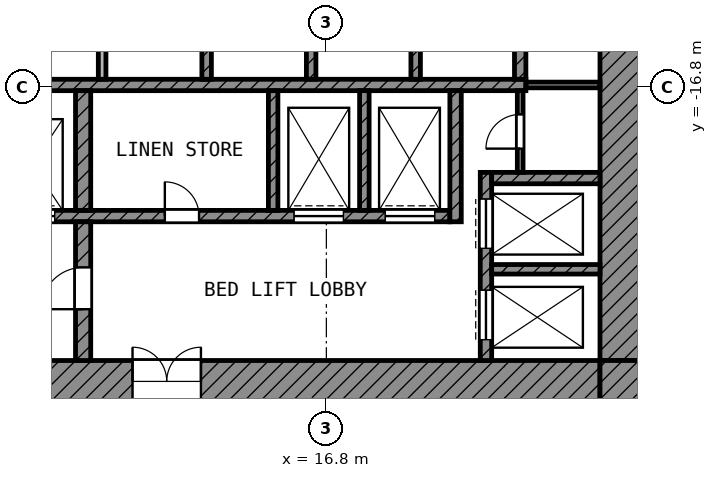
"""IFC4 building model, lengths in metres.
Left out: names, types, materials, properties, quantities, classifications, styles, units other than length and angle.
Written with IfcOpenShell. Run it as: python <this file> out.ifc"""

import sys

from ifc_helpers import new_model, si_unit, direction, frame, frame_2d, origin, place, context, subcontext, project, spatial, rectangle, extrude, element, fill, save


model = new_model("IFC4")
c1 = context("Model", 3, precision=1e-05, world=origin(), true_north=direction((0.0, 1.0)))
c2 = subcontext(c1, "Body", "Model", "MODEL_VIEW")
j1 = project(units=[si_unit("LENGTHUNIT", "METRE"), si_unit("PLANEANGLEUNIT", "RADIAN")], contexts=[c1])
p1 = place(None, origin())
s1 = spatial("IfcSite", under=j1, at=p1, CompositionType="ELEMENT")
p2 = place(p1, origin())
s2 = spatial("IfcBuilding", under=s1, at=p2, CompositionType="ELEMENT")
p3 = place(p2, frame((0.0, 0.0, 77.0)))
s3 = spatial("IfcBuildingStorey", under=s2, at=p3, CompositionType="ELEMENT", Elevation=77.0)
p4 = place(p3, frame((24.55, -24.0, 0.0), z_axis=(0.0, 0.0, 1.0), x_axis=(0.0, 1.0, 0.0)))
e1 = element("IfcWall", 1, at=p4, inside=s3, PredefinedType="SHEAR", context=c2, shape_type="SweptSolid", body=[
    extrude(rectangle(XDim=18.6, YDim=1.1, at=frame_2d((9.3, 0.0))), origin(), (0.0, 0.0, 1.0), 3.9),
])
p5 = place(p4, frame((10.5, 0.0, 0.0)))
e2 = element("IfcOpeningElement", 2, at=p5, cuts=e1, PredefinedType="OPENING", context=c2, shape_type="SweptSolid", body=[
    extrude(rectangle(XDim=1.8, YDim=2.1, at=frame_2d((0.9, 1.05))), frame((0.0, 0.56, 0.0), z_axis=(0.0, -1.0, 0.0), x_axis=(1.0, 0.0, 0.0)), (0.0, 0.0, 1.0), 1.12),
])
p6 = place(p3, frame((5.4, -24.55, 0.0), z_axis=(0.0, 0.0, 1.0), x_axis=(1.0, 0.0, 0.0)))
e3 = element("IfcWall", 3, at=p6, inside=s3, PredefinedType="SHEAR", context=c2, shape_type="SweptSolid", body=[
    extrude(rectangle(XDim=18.6, YDim=1.1, at=frame_2d((9.3, 0.0))), origin(), (0.0, 0.0, 1.0), 3.9),
])
p7 = place(p6, frame((6.3, 0.0, 0.0)))
e4 = element("IfcOpeningElement", 4, at=p7, cuts=e3, PredefinedType="OPENING", context=c2, shape_type="SweptSolid", body=[
    extrude(rectangle(XDim=1.8, YDim=2.1, at=frame_2d((0.9, 1.05))), frame((0.0, 0.56, 0.0), z_axis=(0.0, -1.0, 0.0), x_axis=(1.0, 0.0, 0.0)), (0.0, 0.0, 1.0), 1.12),
])
p8 = place(p3, frame((24.55, -25.1, 0.0), z_axis=(0.0, 0.0, 1.0), x_axis=(0.0, 1.0, 0.0)))
e5 = element("IfcWall", 5, at=p8, inside=s3, PredefinedType="SHEAR", context=c2, shape_type="SweptSolid", body=[
    extrude(rectangle(XDim=1.1, YDim=1.1, at=frame_2d((0.55, 0.0))), origin(), (0.0, 0.0, 1.0), 3.9),
])
p9 = place(p3, frame((5.4, -16.75, 0.0), z_axis=(0.0, 0.0, 1.0), x_axis=(1.0, 0.0, 0.0)))
e6 = element("IfcWall", 6, at=p9, inside=s3, PredefinedType="SHEAR", context=c2, shape_type="SweptSolid", body=[
    extrude(rectangle(XDim=16.65, YDim=0.3, at=frame_2d((8.325, 0.0))), origin(), (0.0, 0.0, 1.0), 3.9),
])
p10 = place(p3, frame((5.4, -20.2, 0.0), z_axis=(0.0, 0.0, 1.0), x_axis=(1.0, 0.0, 0.0)))
e7 = element("IfcWall", 7, at=p10, inside=s3, PredefinedType="SHEAR", context=c2, shape_type="SweptSolid", body=[
    extrude(rectangle(XDim=14.65, YDim=0.3, at=frame_2d((7.325, 0.0))), origin(), (0.0, 0.0, 1.0), 3.9),
])
p11 = place(p10, frame((10.55, 0.0, 0.0)))
e8 = element("IfcOpeningElement", 8, at=p11, cuts=e7, PredefinedType="OPENING", context=c2, shape_type="SweptSolid", body=[
    extrude(rectangle(XDim=1.3, YDim=2.1, at=frame_2d((0.65, 1.05))), frame((0.0, 0.16, 0.0), z_axis=(0.0, -1.0, 0.0), x_axis=(1.0, 0.0, 0.0)), (0.0, 0.0, 1.0), 0.32),
])
p12 = place(p10, frame((12.95, 0.0, 0.0)))
e9 = element("IfcOpeningElement", 9, at=p12, cuts=e7, PredefinedType="OPENING", context=c2, shape_type="SweptSolid", body=[
    extrude(rectangle(XDim=1.3, YDim=2.1, at=frame_2d((0.65, 1.05))), frame((0.0, 0.16, 0.0), z_axis=(0.0, -1.0, 0.0), x_axis=(1.0, 0.0, 0.0)), (0.0, 0.0, 1.0), 0.32),
])
p13 = place(p10, frame((0.55, 0.0, 0.0)))
e10 = element("IfcOpeningElement", 10, at=p13, cuts=e7, PredefinedType="OPENING", context=c2, shape_type="SweptSolid", body=[
    extrude(rectangle(XDim=1.3, YDim=2.1, at=frame_2d((0.65, 1.05))), frame((0.0, 0.16, 0.0), z_axis=(0.0, -1.0, 0.0), x_axis=(1.0, 0.0, 0.0)), (0.0, 0.0, 1.0), 0.32),
])
p14 = place(p10, frame((2.95, 0.0, 0.0)))
e11 = element("IfcOpeningElement", 11, at=p14, cuts=e7, PredefinedType="OPENING", context=c2, shape_type="SweptSolid", body=[
    extrude(rectangle(XDim=1.3, YDim=2.1, at=frame_2d((0.65, 1.05))), frame((0.0, 0.16, 0.0), z_axis=(0.0, -1.0, 0.0), x_axis=(1.0, 0.0, 0.0)), (0.0, 0.0, 1.0), 0.32),
])
p15 = place(p10, frame((7.15, 0.0, 0.0)))
e12 = element("IfcOpeningElement", 12, at=p15, cuts=e7, PredefinedType="OPENING", context=c2, shape_type="SweptSolid", body=[
    extrude(rectangle(XDim=0.9, YDim=2.1, at=frame_2d((0.45, 1.05))), frame((0.0, 0.16, 0.0), z_axis=(0.0, -1.0, 0.0), x_axis=(1.0, 0.0, 0.0)), (0.0, 0.0, 1.0), 0.32),
])
p16 = place(p3, frame((10.4, -24.0, 0.0), z_axis=(0.0, 0.0, 1.0), x_axis=(0.0, 1.0, 0.0)))
e13 = element("IfcWall", 13, at=p16, inside=s3, PredefinedType="SHEAR", context=c2, shape_type="SweptSolid", body=[
    extrude(rectangle(XDim=3.65, YDim=0.4, at=frame_2d((1.825, 0.0))), origin(), (0.0, 0.0, 1.0), 3.9),
])
p17 = place(p16, frame((1.35, 0.0, 0.0)))
e14 = element("IfcOpeningElement", 14, at=p17, cuts=e13, PredefinedType="OPENING", context=c2, shape_type="SweptSolid", body=[
    extrude(rectangle(XDim=1.1, YDim=2.1, at=frame_2d((0.55, 1.05))), frame((0.0, 0.21, 0.0), z_axis=(0.0, -1.0, 0.0), x_axis=(1.0, 0.0, 0.0)), (0.0, 0.0, 1.0), 0.42),
])
p18 = place(p3, frame((10.4, -20.05, 0.0), z_axis=(0.0, 0.0, 1.0), x_axis=(0.0, 1.0, 0.0)))
e15 = element("IfcWall", 15, at=p18, inside=s3, PredefinedType="SHEAR", context=c2, shape_type="SweptSolid", body=[
    extrude(rectangle(XDim=3.15, YDim=0.4, at=frame_2d((1.575, 0.0))), origin(), (0.0, 0.0, 1.0), 3.9),
])
p19 = place(p3, frame((20.2, -20.35, 0.0), z_axis=(0.0, 0.0, 1.0), x_axis=(0.0, 1.0, 0.0)))
e16 = element("IfcWall", 16, at=p19, inside=s3, PredefinedType="SHEAR", context=c2, shape_type="SweptSolid", body=[
    extrude(rectangle(XDim=3.45, YDim=0.3, at=frame_2d((1.725, 0.0))), origin(), (0.0, 0.0, 1.0), 3.9),
])
p20 = place(p3, frame((21.9, -16.6, 0.0), z_axis=(0.0, 0.0, 1.0), x_axis=(0.0, 1.0, 0.0)))
e17 = element("IfcWall", 17, at=p20, inside=s3, PredefinedType="SHEAR", context=c2, shape_type="SweptSolid", body=[
    extrude(rectangle(XDim=2.35, YDim=0.3, at=frame_2d((1.175, 0.0))), origin(), (0.0, 0.0, 1.0), 3.9),
])
p21 = place(p3, frame((21.15, -19.2, 0.0), z_axis=(0.0, 0.0, 1.0), x_axis=(1.0, 0.0, 0.0)))
e18 = element("IfcWall", 18, at=p21, inside=s3, PredefinedType="SHEAR", context=c2, shape_type="SweptSolid", body=[
    extrude(rectangle(XDim=2.85, YDim=0.3, at=frame_2d((1.425, 0.0))), origin(), (0.0, 0.0, 1.0), 3.9),
])
p22 = place(p3, frame((21.0, -24.0, 0.0), z_axis=(0.0, 0.0, 1.0), x_axis=(0.0, 1.0, 0.0)))
e19 = element("IfcWall", 19, at=p22, inside=s3, PredefinedType="SHEAR", context=c2, shape_type="SweptSolid", body=[
    extrude(rectangle(XDim=4.95, YDim=0.3, at=frame_2d((2.475, 0.0))), origin(), (0.0, 0.0, 1.0), 3.9),
])
p23 = place(p22, frame((2.95, 0.0, 0.0)))
e20 = element("IfcOpeningElement", 20, at=p23, cuts=e19, PredefinedType="OPENING", context=c2, shape_type="SweptSolid", body=[
    extrude(rectangle(XDim=1.3, YDim=2.1, at=frame_2d((0.65, 1.05))), frame((0.0, 0.16, 0.0), z_axis=(0.0, -1.0, 0.0), x_axis=(1.0, 0.0, 0.0)), (0.0, 0.0, 1.0), 0.32),
])
p24 = place(p22, frame((0.55, 0.0, 0.0)))
e21 = element("IfcOpeningElement", 21, at=p24, cuts=e19, PredefinedType="OPENING", context=c2, shape_type="SweptSolid", body=[
    extrude(rectangle(XDim=1.3, YDim=2.1, at=frame_2d((0.65, 1.05))), frame((0.0, 0.16, 0.0), z_axis=(0.0, -1.0, 0.0), x_axis=(1.0, 0.0, 0.0)), (0.0, 0.0, 1.0), 0.32),
])
p25 = place(p3, frame((21.15, -21.6, 0.0), z_axis=(0.0, 0.0, 1.0), x_axis=(1.0, 0.0, 0.0)))
e22 = element("IfcWall", 22, at=p25, inside=s3, PredefinedType="SHEAR", context=c2, shape_type="SweptSolid", body=[
    extrude(rectangle(XDim=2.85, YDim=0.25, at=frame_2d((1.425, 0.0))), origin(), (0.0, 0.0, 1.0), 3.9),
])
for number, where, z_axis, x_axis in (
    (23, (15.4, -20.05, 0.0), (0.0, 0.0, 1.0), (0.0, 1.0, 0.0)),
    (24, (17.8, -20.05, 0.0), (0.0, 0.0, 1.0), (0.0, 1.0, 0.0)),
):
    element("IfcWall", number, at=place(p3, frame(where, z_axis=z_axis, x_axis=x_axis)), inside=s3, PredefinedType="SHEAR", context=c2, shape_type="SweptSolid", body=[
        extrude(rectangle(XDim=3.15, YDim=0.25, at=frame_2d((1.575, 0.0))), origin(), (0.0, 0.0, 1.0), 3.9),
    ])
p26 = place(p3, frame((10.9, -16.6, 0.0), z_axis=(0.0, 0.0, 1.0), x_axis=(0.0, 1.0, 0.0)))
e25 = element("IfcWall", 25, at=p26, inside=s3, PredefinedType="PARTITIONING", context=c2, shape_type="SweptSolid", body=[
    extrude(rectangle(XDim=2.35, YDim=0.2, at=frame_2d((1.175, 0.0))), origin(), (0.0, 0.0, 1.0), 3.9),
])
for number, where, z_axis, x_axis in (
    (26, (13.65, -16.6, 0.0), (0.0, 0.0, 1.0), (0.0, 1.0, 0.0)),
    (27, (16.4, -16.6, 0.0), (0.0, 0.0, 1.0), (0.0, 1.0, 0.0)),
    (28, (19.15, -16.6, 0.0), (0.0, 0.0, 1.0), (0.0, 1.0, 0.0)),
):
    element("IfcWall", number, at=place(p3, frame(where, z_axis=z_axis, x_axis=x_axis)), inside=s3, PredefinedType="SHEAR", context=c2, shape_type="SweptSolid", body=[
        extrude(rectangle(XDim=2.35, YDim=0.25, at=frame_2d((1.175, 0.0))), origin(), (0.0, 0.0, 1.0), 3.9),
    ])
p27 = place(p3, frame((21.9, -19.05, 0.0), z_axis=(0.0, 0.0, 1.0), x_axis=(0.0, 1.0, 0.0)))
e29 = element("IfcWall", 29, at=p27, inside=s3, PredefinedType="PARTITIONING", context=c2, shape_type="SweptSolid", body=[
    extrude(rectangle(XDim=2.15, YDim=0.15, at=frame_2d((1.075, 0.0))), origin(), (0.0, 0.0, 1.0), 3.9),
])
p28 = place(p27, frame((0.625, 0.0, 0.0)))
e30 = element("IfcOpeningElement", 30, at=p28, cuts=e29, PredefinedType="OPENING", context=c2, shape_type="SweptSolid", body=[
    extrude(rectangle(XDim=0.9, YDim=2.1, at=frame_2d((0.45, 1.05))), frame((0.0, 0.085, 0.0), z_axis=(0.0, -1.0, 0.0), x_axis=(1.0, 0.0, 0.0)), (0.0, 0.0, 1.0), 0.17),
])
p29 = place(p3, frame((22.05, -16.75, 0.0), z_axis=(0.0, 0.0, 1.0), x_axis=(1.0, 0.0, 0.0)))
e31 = element("IfcWall", 31, at=p29, inside=s3, PredefinedType="PARTITIONING", context=c2, shape_type="SweptSolid", body=[
    extrude(rectangle(XDim=1.95, YDim=0.15, at=frame_2d((0.975, 0.0))), origin(), (0.0, 0.0, 1.0), 3.9),
])
p30 = place(p23, origin())
e32 = element("IfcDoor", 32, at=p30, inside=s3, OperationType="DOUBLE_DOOR_SLIDING", PredefinedType="DOOR", context=c2, shape_type="SweptSolid", body=[
    extrude(rectangle(XDim=1.3, YDim=2.1, at=frame_2d((0.65, 1.05))), frame((0.0, 0.025, 0.0), z_axis=(0.0, -1.0, 0.0), x_axis=(1.0, 0.0, 0.0)), (0.0, 0.0, 1.0), 0.05),
])
fill(e20, e32)
p31 = place(p24, origin())
e33 = element("IfcDoor", 33, at=p31, inside=s3, OperationType="DOUBLE_DOOR_SLIDING", PredefinedType="DOOR", context=c2, shape_type="SweptSolid", body=[
    extrude(rectangle(XDim=1.3, YDim=2.1, at=frame_2d((0.65, 1.05))), frame((0.0, 0.025, 0.0), z_axis=(0.0, -1.0, 0.0), x_axis=(1.0, 0.0, 0.0)), (0.0, 0.0, 1.0), 0.05),
])
fill(e21, e33)
p32 = place(p11, origin())
e34 = element("IfcDoor", 34, at=p32, inside=s3, OperationType="DOUBLE_DOOR_SLIDING", PredefinedType="DOOR", context=c2, shape_type="SweptSolid", body=[
    extrude(rectangle(XDim=1.3, YDim=2.1, at=frame_2d((0.65, 1.05))), frame((0.0, 0.025, 0.0), z_axis=(0.0, -1.0, 0.0), x_axis=(1.0, 0.0, 0.0)), (0.0, 0.0, 1.0), 0.05),
])
fill(e8, e34)
p33 = place(p12, origin())
e35 = element("IfcDoor", 35, at=p33, inside=s3, OperationType="DOUBLE_DOOR_SLIDING", PredefinedType="DOOR", context=c2, shape_type="SweptSolid", body=[
    extrude(rectangle(XDim=1.3, YDim=2.1, at=frame_2d((0.65, 1.05))), frame((0.0, 0.025, 0.0), z_axis=(0.0, -1.0, 0.0), x_axis=(1.0, 0.0, 0.0)), (0.0, 0.0, 1.0), 0.05),
])
fill(e9, e35)
p34 = place(p14, origin())
e36 = element("IfcDoor", 36, at=p34, inside=s3, OperationType="DOUBLE_DOOR_SLIDING", PredefinedType="DOOR", context=c2, shape_type="SweptSolid", body=[
    extrude(rectangle(XDim=1.3, YDim=2.1, at=frame_2d((0.65, 1.05))), frame((0.0, 0.025, 0.0), z_axis=(0.0, -1.0, 0.0), x_axis=(1.0, 0.0, 0.0)), (0.0, 0.0, 1.0), 0.05),
])
fill(e11, e36)
p35 = place(p17, origin())
e37 = element("IfcDoor", 37, at=p35, inside=s3, OperationType="SINGLE_SWING_LEFT", PredefinedType="DOOR", context=c2, shape_type="SweptSolid", body=[
    extrude(rectangle(XDim=1.1, YDim=2.1, at=frame_2d((0.55, 1.05))), frame((0.0, 0.025, 0.0), z_axis=(0.0, -1.0, 0.0), x_axis=(1.0, 0.0, 0.0)), (0.0, 0.0, 1.0), 0.05),
])
fill(e14, e37)
p36 = place(p7, origin())
e38 = element("IfcDoor", 38, at=p36, inside=s3, OperationType="DOUBLE_DOOR_SINGLE_SWING", PredefinedType="DOOR", context=c2, shape_type="SweptSolid", body=[
    extrude(rectangle(XDim=1.8, YDim=2.1, at=frame_2d((0.9, 1.05))), frame((0.0, 0.025, 0.0), z_axis=(0.0, -1.0, 0.0), x_axis=(1.0, 0.0, 0.0)), (0.0, 0.0, 1.0), 0.05),
])
fill(e4, e38)
p37 = place(p28, origin())
e39 = element("IfcDoor", 39, at=p37, inside=s3, OperationType="SINGLE_SWING_LEFT", PredefinedType="DOOR", context=c2, shape_type="SweptSolid", body=[
    extrude(rectangle(XDim=0.9, YDim=2.1, at=frame_2d((0.45, 1.05))), frame((0.0, 0.025, 0.0), z_axis=(0.0, -1.0, 0.0), x_axis=(1.0, 0.0, 0.0)), (0.0, 0.0, 1.0), 0.05),
])
fill(e30, e39)
p38 = place(p15, origin())
e40 = element("IfcDoor", 40, at=p38, inside=s3, OperationType="SINGLE_SWING_LEFT", PredefinedType="DOOR", context=c2, shape_type="SweptSolid", body=[
    extrude(rectangle(XDim=0.9, YDim=2.1, at=frame_2d((0.45, 1.05))), frame((0.0, 0.025, 0.0), z_axis=(0.0, -1.0, 0.0), x_axis=(1.0, 0.0, 0.0)), (0.0, 0.0, 1.0), 0.05),
])
fill(e12, e40)
save(model, sys.argv[1])
